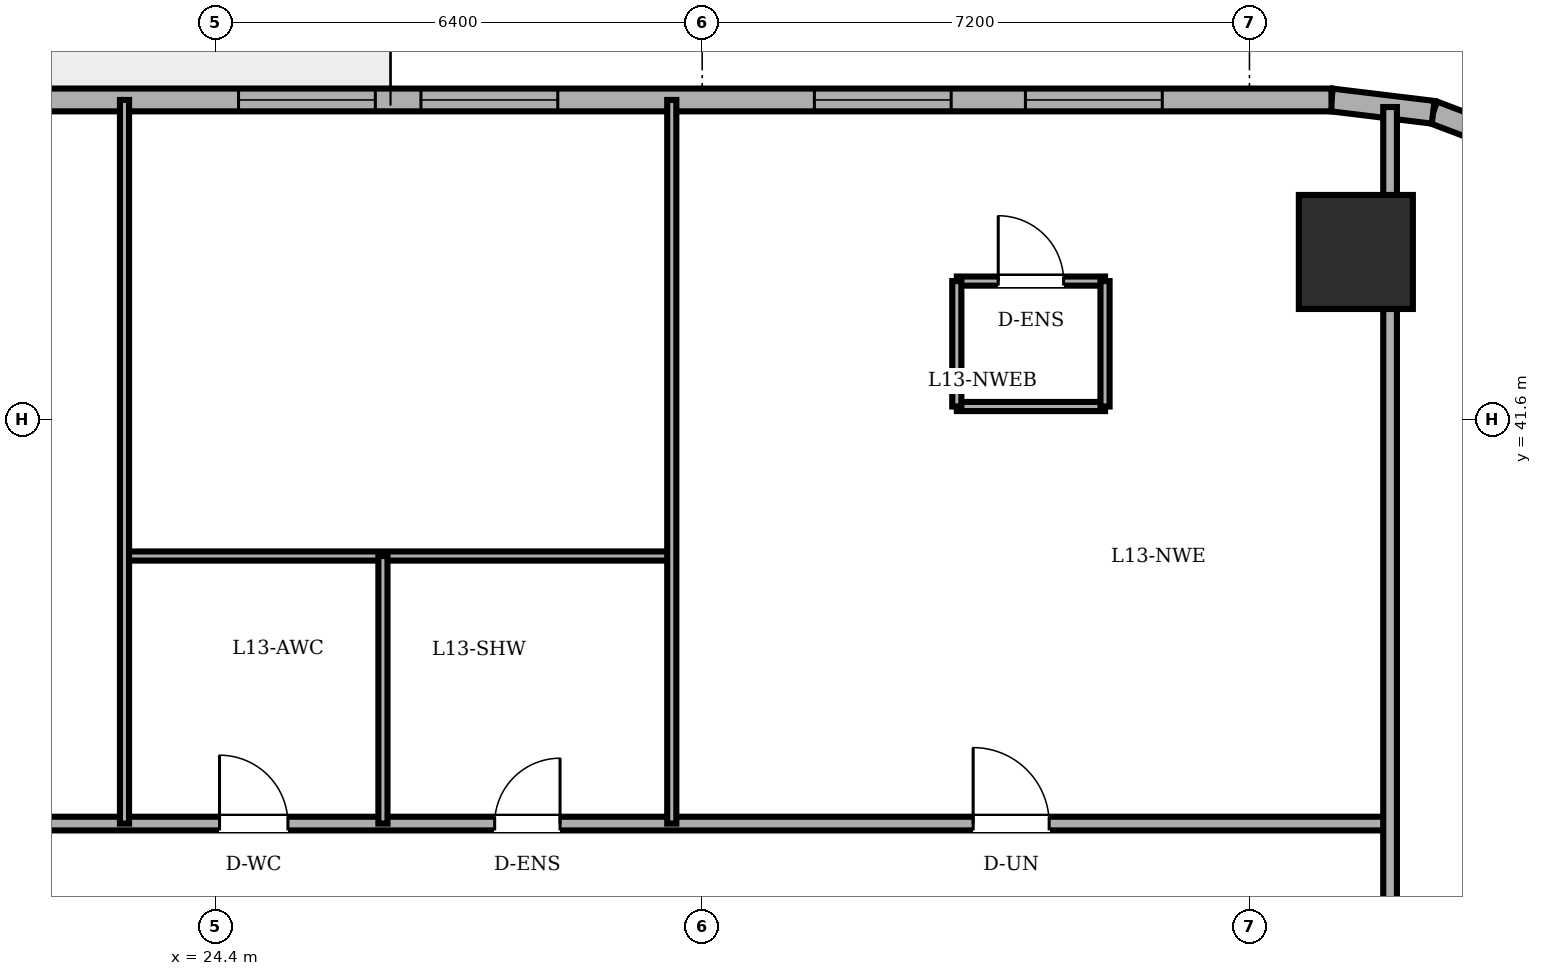
"""IFC4 building model, lengths in metres.
Left out: names, types, materials, properties, quantities, classifications, styles, units other than length and angle.
Written with IfcOpenShell. Run it as: python <this file> out.ifc"""

import sys

from ifc_helpers import new_model, si_unit, direction, frame, frame_2d, origin, origin_2d, place, context, subcontext, project, spatial, rectangle, circle, extrude, element, fill, save


model = new_model("IFC4")
c1 = context("Model", 3, precision=1e-05, world=origin(), true_north=direction((0.0, 1.0)))
c2 = subcontext(c1, "Body", "Model", "MODEL_VIEW")
j1 = project(units=[si_unit("LENGTHUNIT", "METRE"), si_unit("PLANEANGLEUNIT", "RADIAN")], contexts=[c1])
p1 = place(None, origin())
s1 = spatial("IfcSite", under=j1, at=p1, CompositionType="ELEMENT")
p2 = place(p1, origin())
s2 = spatial("IfcBuilding", under=s1, at=p2, CompositionType="ELEMENT")
p3 = place(p2, frame((0.0, 0.0, 50.4)))
s3 = spatial("IfcBuildingStorey", under=s2, at=p3, CompositionType="ELEMENT", Elevation=50.4)
p4 = place(p3, frame((39.4, 43.8, 0.0), z_axis=(0.0, 0.0, 1.0), x_axis=(1.0, 0.0, 0.0)))
e1 = element("IfcColumn", 1, at=p4, inside=s3, PredefinedType="COLUMN", context=c2, shape_type="SweptSolid", body=[
    extrude(circle(Radius=0.75, at=origin_2d()), origin(), (0.0, 0.0, 1.0), 3.6),
])
p5 = place(p3, frame((41.679, 45.16, 0.0), z_axis=(0.0, 0.0, 1.0), x_axis=(-0.935156721165, 0.354234254216, 0.0)))
e2 = element("IfcWall", 2, at=p5, inside=s3, PredefinedType="SOLIDWALL", context=c2, shape_type="SweptSolid", body=[
    extrude(rectangle(XDim=1.349, YDim=0.3, at=frame_2d((0.675, 0.0))), origin(), (0.0, 0.0, 1.0), 3.4),
])
p6 = place(p3, frame((40.417, 45.638, 0.0), z_axis=(0.0, 0.0, 1.0), x_axis=(-0.992739027259, 0.120288086515, 0.0)))
e3 = element("IfcWall", 3, at=p6, inside=s3, PredefinedType="SOLIDWALL", context=c2, shape_type="SweptSolid", body=[
    extrude(rectangle(XDim=1.348, YDim=0.3, at=frame_2d((0.674, 0.0))), origin(), (0.0, 0.0, 1.0), 3.4),
])
p7 = place(p3, frame((39.079, 45.8, 0.0), z_axis=(0.0, 0.0, 1.0), x_axis=(-1.0, 0.0, 0.0)))
e4 = element("IfcWall", 4, at=p7, inside=s3, PredefinedType="SOLIDWALL", context=c2, shape_type="SweptSolid", body=[
    extrude(rectangle(XDim=30.079, YDim=0.3, at=frame_2d((15.04, 0.0))), origin(), (0.0, 0.0, 1.0), 3.4),
])
p8 = place(p7, frame((22.404, 0.0, 0.0)))
e5 = element("IfcOpeningElement", 5, at=p8, cuts=e4, PredefinedType="OPENING", context=c2, shape_type="SweptSolid", body=[
    extrude(rectangle(XDim=0.95, YDim=2.2, at=frame_2d((0.475, 1.1))), frame((0.0, 0.16, 0.0), z_axis=(0.0, -1.0, 0.0), x_axis=(1.0, 0.0, 0.0)), (0.0, 0.0, 1.0), 0.32),
])
p9 = place(p7, frame((2.226, 0.0, 0.85)))
e6 = element("IfcOpeningElement", 6, at=p9, cuts=e4, PredefinedType="OPENING", context=c2, shape_type="SweptSolid", body=[
    extrude(rectangle(XDim=1.8, YDim=1.55, at=frame_2d((0.9, 0.775))), frame((0.0, 0.16, 0.0), z_axis=(0.0, -1.0, 0.0), x_axis=(1.0, 0.0, 0.0)), (0.0, 0.0, 1.0), 0.32),
])
p10 = place(p7, frame((5.003, 0.0, 0.85)))
e7 = element("IfcOpeningElement", 7, at=p10, cuts=e4, PredefinedType="OPENING", context=c2, shape_type="SweptSolid", body=[
    extrude(rectangle(XDim=1.8, YDim=1.55, at=frame_2d((0.9, 0.775))), frame((0.0, 0.16, 0.0), z_axis=(0.0, -1.0, 0.0), x_axis=(1.0, 0.0, 0.0)), (0.0, 0.0, 1.0), 0.32),
])
p11 = place(p7, frame((10.179, 0.0, 0.85)))
e8 = element("IfcOpeningElement", 8, at=p11, cuts=e4, PredefinedType="OPENING", context=c2, shape_type="SweptSolid", body=[
    extrude(rectangle(XDim=1.8, YDim=1.55, at=frame_2d((0.9, 0.775))), frame((0.0, 0.16, 0.0), z_axis=(0.0, -1.0, 0.0), x_axis=(1.0, 0.0, 0.0)), (0.0, 0.0, 1.0), 0.32),
])
p12 = place(p7, frame((12.579, 0.0, 0.85)))
e9 = element("IfcOpeningElement", 9, at=p12, cuts=e4, PredefinedType="OPENING", context=c2, shape_type="SweptSolid", body=[
    extrude(rectangle(XDim=1.8, YDim=1.55, at=frame_2d((0.9, 0.775))), frame((0.0, 0.16, 0.0), z_axis=(0.0, -1.0, 0.0), x_axis=(1.0, 0.0, 0.0)), (0.0, 0.0, 1.0), 0.32),
])
p13 = place(p7, frame((19.596, 0.0, 0.85)))
e10 = element("IfcOpeningElement", 10, at=p13, cuts=e4, PredefinedType="OPENING", context=c2, shape_type="SweptSolid", body=[
    extrude(rectangle(XDim=1.8, YDim=1.55, at=frame_2d((0.9, 0.775))), frame((0.0, 0.16, 0.0), z_axis=(0.0, -1.0, 0.0), x_axis=(1.0, 0.0, 0.0)), (0.0, 0.0, 1.0), 0.32),
])
p14 = place(p7, frame((24.212, 0.0, 0.85)))
e11 = element("IfcOpeningElement", 11, at=p14, cuts=e4, PredefinedType="OPENING", context=c2, shape_type="SweptSolid", body=[
    extrude(rectangle(XDim=1.8, YDim=1.55, at=frame_2d((0.9, 0.775))), frame((0.0, 0.16, 0.0), z_axis=(0.0, -1.0, 0.0), x_axis=(1.0, 0.0, 0.0)), (0.0, 0.0, 1.0), 0.32),
])
p15 = place(p3, frame((34.15, 43.417, 0.0), z_axis=(0.0, 0.0, 1.0), x_axis=(1.0, 0.0, 0.0)))
e12 = element("IfcWall", 12, at=p15, inside=s3, PredefinedType="PARTITIONING", context=c2, shape_type="SweptSolid", body=[
    extrude(rectangle(XDim=1.95, YDim=0.12, at=frame_2d((0.975, 0.0))), origin(), (0.0, 0.0, 1.0), 3.4),
])
p16 = place(p15, frame((0.545, 0.0, 0.0)))
e13 = element("IfcOpeningElement", 13, at=p16, cuts=e12, PredefinedType="OPENING", context=c2, shape_type="SweptSolid", body=[
    extrude(rectangle(XDim=0.86, YDim=2.1, at=frame_2d((0.43, 1.05))), frame((0.0, 0.07, 0.0), z_axis=(0.0, -1.0, 0.0), x_axis=(1.0, 0.0, 0.0)), (0.0, 0.0, 1.0), 0.14),
])
p17 = place(p3, frame((36.1, 41.767, 0.0), z_axis=(0.0, 0.0, 1.0), x_axis=(-1.0, 0.0, 0.0)))
e14 = element("IfcWall", 14, at=p17, inside=s3, PredefinedType="PARTITIONING", context=c2, shape_type="SweptSolid", body=[
    extrude(rectangle(XDim=1.95, YDim=0.12, at=frame_2d((0.975, 0.0))), origin(), (0.0, 0.0, 1.0), 3.4),
])
for number, where, z_axis, x_axis in (
    (15, (34.15, 43.417, 0.0), (0.0, 0.0, 1.0), (0.0, -1.0, 0.0)),
    (16, (36.1, 41.767, 0.0), (0.0, 0.0, 1.0), (0.0, 1.0, 0.0)),
):
    element("IfcWall", number, at=place(p3, frame(where, z_axis=z_axis, x_axis=x_axis)), inside=s3, PredefinedType="PARTITIONING", context=c2, shape_type="SweptSolid", body=[
        extrude(rectangle(XDim=1.65, YDim=0.12, at=frame_2d((0.825, 0.0))), origin(), (0.0, 0.0, 1.0), 3.4),
    ])
p18 = place(p3, frame((3.4, 36.28, 0.0), z_axis=(0.0, 0.0, 1.0), x_axis=(1.0, 0.0, 0.0)))
e17 = element("IfcWall", 17, at=p18, inside=s3, PredefinedType="PARTITIONING", context=c2, shape_type="SweptSolid", body=[
    extrude(rectangle(XDim=36.45, YDim=0.18, at=frame_2d((18.225, 0.0))), origin(), (0.0, 0.0, 1.0), 3.4),
])
p19 = place(p18, frame((21.05, 0.0, 0.0)))
e18 = element("IfcOpeningElement", 18, at=p19, cuts=e17, PredefinedType="OPENING", context=c2, shape_type="SweptSolid", body=[
    extrude(rectangle(XDim=0.9, YDim=2.1, at=frame_2d((0.45, 1.05))), frame((0.0, 0.1, 0.0), z_axis=(0.0, -1.0, 0.0), x_axis=(1.0, 0.0, 0.0)), (0.0, 0.0, 1.0), 0.2),
])
p20 = place(p18, frame((24.67, 0.0, 0.0)))
e19 = element("IfcOpeningElement", 19, at=p20, cuts=e17, PredefinedType="OPENING", context=c2, shape_type="SweptSolid", body=[
    extrude(rectangle(XDim=0.86, YDim=2.1, at=frame_2d((0.43, 1.05))), frame((0.0, 0.1, 0.0), z_axis=(0.0, -1.0, 0.0), x_axis=(1.0, 0.0, 0.0)), (0.0, 0.0, 1.0), 0.2),
])
p21 = place(p18, frame((10.7, 0.0, 0.0)))
e20 = element("IfcOpeningElement", 20, at=p21, cuts=e17, PredefinedType="OPENING", context=c2, shape_type="SweptSolid", body=[
    extrude(rectangle(XDim=1.0, YDim=2.15, at=frame_2d((0.5, 1.075))), frame((0.0, 0.1, 0.0), z_axis=(0.0, -1.0, 0.0), x_axis=(1.0, 0.0, 0.0)), (0.0, 0.0, 1.0), 0.2),
])
p22 = place(p18, frame((30.965, 0.0, 0.0)))
e21 = element("IfcOpeningElement", 21, at=p22, cuts=e17, PredefinedType="OPENING", context=c2, shape_type="SweptSolid", body=[
    extrude(rectangle(XDim=1.0, YDim=2.15, at=frame_2d((0.5, 1.075))), frame((0.0, 0.1, 0.0), z_axis=(0.0, -1.0, 0.0), x_axis=(1.0, 0.0, 0.0)), (0.0, 0.0, 1.0), 0.2),
])
p23 = place(p3, frame((23.2, 39.8, 0.0), z_axis=(0.0, 0.0, 1.0), x_axis=(1.0, 0.0, 0.0)))
e22 = element("IfcWall", 22, at=p23, inside=s3, PredefinedType="PARTITIONING", context=c2, shape_type="SweptSolid", body=[
    extrude(rectangle(XDim=7.2, YDim=0.12, at=frame_2d((3.6, 0.0))), origin(), (0.0, 0.0, 1.0), 3.4),
])
p24 = place(p3, frame((23.2, 36.28, 0.0), z_axis=(0.0, 0.0, 1.0), x_axis=(0.0, 1.0, 0.0)))
e23 = element("IfcWall", 23, at=p24, inside=s3, PredefinedType="PARTITIONING", context=c2, shape_type="SweptSolid", body=[
    extrude(rectangle(XDim=9.52, YDim=0.12, at=frame_2d((4.76, 0.0))), origin(), (0.0, 0.0, 1.0), 3.4),
])
p25 = place(p3, frame((26.6, 36.28, 0.0), z_axis=(0.0, 0.0, 1.0), x_axis=(0.0, 1.0, 0.0)))
e24 = element("IfcWall", 24, at=p25, inside=s3, PredefinedType="PARTITIONING", context=c2, shape_type="SweptSolid", body=[
    extrude(rectangle(XDim=3.52, YDim=0.12, at=frame_2d((1.76, 0.0))), origin(), (0.0, 0.0, 1.0), 3.4),
])
p26 = place(p3, frame((30.4, 36.28, 0.0), z_axis=(0.0, 0.0, 1.0), x_axis=(0.0, 1.0, 0.0)))
e25 = element("IfcWall", 25, at=p26, inside=s3, PredefinedType="PARTITIONING", context=c2, shape_type="SweptSolid", body=[
    extrude(rectangle(XDim=9.52, YDim=0.12, at=frame_2d((4.76, 0.0))), origin(), (0.0, 0.0, 1.0), 3.4),
])
p27 = place(p3, frame((39.85, 25.18, 0.0), z_axis=(0.0, 0.0, 1.0), x_axis=(0.0, 1.0, 0.0)))
e26 = element("IfcWall", 26, at=p27, inside=s3, PredefinedType="PARTITIONING", context=c2, shape_type="SweptSolid", body=[
    extrude(rectangle(XDim=20.527, YDim=0.18, at=frame_2d((10.264, 0.0))), origin(), (0.0, 0.0, 1.0), 2.782),
])
p28 = place(p27, frame((5.35, 0.0, 0.0)))
e27 = element("IfcOpeningElement", 27, at=p28, cuts=e26, PredefinedType="OPENING", context=c2, shape_type="SweptSolid", body=[
    extrude(rectangle(XDim=0.92, YDim=2.1, at=frame_2d((0.46, 1.05))), frame((0.0, 0.1, 0.0), z_axis=(0.0, -1.0, 0.0), x_axis=(1.0, 0.0, 0.0)), (0.0, 0.0, 1.0), 0.2),
])
p29 = place(p9, origin())
e28 = element("IfcWindow", 28, at=p29, inside=s3, PartitioningType="DOUBLE_PANEL_VERTICAL", PredefinedType="WINDOW", context=c2, shape_type="SweptSolid", body=[
    extrude(rectangle(XDim=1.8, YDim=1.55, at=frame_2d((0.9, 0.775))), frame((0.0, 0.03, 0.0), z_axis=(0.0, -1.0, 0.0), x_axis=(1.0, 0.0, 0.0)), (0.0, 0.0, 1.0), 0.06),
])
fill(e6, e28)
p30 = place(p10, origin())
e29 = element("IfcWindow", 29, at=p30, inside=s3, PartitioningType="DOUBLE_PANEL_VERTICAL", PredefinedType="WINDOW", context=c2, shape_type="SweptSolid", body=[
    extrude(rectangle(XDim=1.8, YDim=1.55, at=frame_2d((0.9, 0.775))), frame((0.0, 0.03, 0.0), z_axis=(0.0, -1.0, 0.0), x_axis=(1.0, 0.0, 0.0)), (0.0, 0.0, 1.0), 0.06),
])
fill(e7, e29)
p31 = place(p11, origin())
e30 = element("IfcWindow", 30, at=p31, inside=s3, PartitioningType="DOUBLE_PANEL_VERTICAL", PredefinedType="WINDOW", context=c2, shape_type="SweptSolid", body=[
    extrude(rectangle(XDim=1.8, YDim=1.55, at=frame_2d((0.9, 0.775))), frame((0.0, 0.03, 0.0), z_axis=(0.0, -1.0, 0.0), x_axis=(1.0, 0.0, 0.0)), (0.0, 0.0, 1.0), 0.06),
])
fill(e8, e30)
p32 = place(p12, origin())
e31 = element("IfcWindow", 31, at=p32, inside=s3, PartitioningType="DOUBLE_PANEL_VERTICAL", PredefinedType="WINDOW", context=c2, shape_type="SweptSolid", body=[
    extrude(rectangle(XDim=1.8, YDim=1.55, at=frame_2d((0.9, 0.775))), frame((0.0, 0.03, 0.0), z_axis=(0.0, -1.0, 0.0), x_axis=(1.0, 0.0, 0.0)), (0.0, 0.0, 1.0), 0.06),
])
fill(e9, e31)
p33 = place(p16, origin())
e32 = element("IfcDoor", 32, at=p33, inside=s3, OperationType="SINGLE_SWING_LEFT", PredefinedType="DOOR", context=c2, shape_type="SweptSolid", body=[
    extrude(rectangle(XDim=0.86, YDim=2.1, at=frame_2d((0.43, 1.05))), frame((0.0, 0.025, 0.0), z_axis=(0.0, -1.0, 0.0), x_axis=(1.0, 0.0, 0.0)), (0.0, 0.0, 1.0), 0.05),
])
fill(e13, e32)
p34 = place(p19, origin())
e33 = element("IfcDoor", 33, at=p34, inside=s3, OperationType="SINGLE_SWING_LEFT", PredefinedType="DOOR", context=c2, shape_type="SweptSolid", body=[
    extrude(rectangle(XDim=0.9, YDim=2.1, at=frame_2d((0.45, 1.05))), frame((0.0, 0.025, 0.0), z_axis=(0.0, -1.0, 0.0), x_axis=(1.0, 0.0, 0.0)), (0.0, 0.0, 1.0), 0.05),
])
fill(e18, e33)
p35 = place(p20, origin())
e34 = element("IfcDoor", 34, at=p35, inside=s3, OperationType="SINGLE_SWING_RIGHT", PredefinedType="DOOR", context=c2, shape_type="SweptSolid", body=[
    extrude(rectangle(XDim=0.86, YDim=2.1, at=frame_2d((0.43, 1.05))), frame((0.0, 0.025, 0.0), z_axis=(0.0, -1.0, 0.0), x_axis=(1.0, 0.0, 0.0)), (0.0, 0.0, 1.0), 0.05),
])
fill(e19, e34)
p36 = place(p22, origin())
e35 = element("IfcDoor", 35, at=p36, inside=s3, OperationType="SINGLE_SWING_LEFT", PredefinedType="DOOR", context=c2, shape_type="SweptSolid", body=[
    extrude(rectangle(XDim=1.0, YDim=2.15, at=frame_2d((0.5, 1.075))), frame((0.0, 0.025, 0.0), z_axis=(0.0, -1.0, 0.0), x_axis=(1.0, 0.0, 0.0)), (0.0, 0.0, 1.0), 0.05),
])
fill(e21, e35)
save(model, sys.argv[1])
